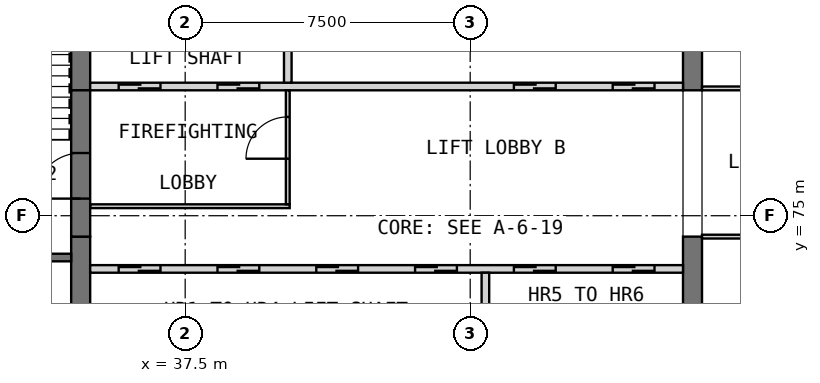
"""IFC4 building model, lengths in metres.
Left out: names, types, materials, properties, quantities, classifications, styles, units other than length and angle.
Written with IfcOpenShell. Run it as: python <this file> out.ifc"""

import sys

from ifc_helpers import new_model, si_unit, direction, frame, frame_2d, origin, place, context, subcontext, project, spatial, rectangle, extrude, element, fill, save


model = new_model("IFC4")
c1 = context("Model", 3, precision=1e-05, world=origin(), true_north=direction((0.0, 1.0)))
c2 = subcontext(c1, "Body", "Model", "MODEL_VIEW")
j1 = project(units=[si_unit("LENGTHUNIT", "METRE"), si_unit("PLANEANGLEUNIT", "RADIAN")], contexts=[c1])
p1 = place(None, origin())
s1 = spatial("IfcSite", under=j1, at=p1, CompositionType="ELEMENT")
p2 = place(p1, origin())
s2 = spatial("IfcBuilding", under=s1, at=p2, CompositionType="ELEMENT")
p3 = place(p2, frame((0.0, 0.0, 137.4)))
s3 = spatial("IfcBuildingStorey", under=s2, at=p3, CompositionType="ELEMENT", Elevation=137.4)
p4 = place(p3, frame((34.75, 68.05, 0.0), z_axis=(0.0, 0.0, 1.0), x_axis=(0.0, 1.0, 0.0)))
e1 = element("IfcWall", 1, at=p4, inside=s3, PredefinedType="SHEAR", context=c2, shape_type="SweptSolid", body=[
    extrude(rectangle(XDim=6.4, YDim=0.5, at=frame_2d((3.2, 0.0))), origin(), (0.0, 0.0, 1.0), 3.6),
])
p5 = place(p3, frame((34.75, 78.3, 0.0), z_axis=(0.0, 0.0, 1.0), x_axis=(0.0, 1.0, 0.0)))
e2 = element("IfcWall", 2, at=p5, inside=s3, PredefinedType="SHEAR", context=c2, shape_type="SweptSolid", body=[
    extrude(rectangle(XDim=3.4, YDim=0.5, at=frame_2d((1.7, 0.0))), origin(), (0.0, 0.0, 1.0), 3.6),
])
p6 = place(p3, frame((50.85, 68.05, 0.0), z_axis=(0.0, 0.0, 1.0), x_axis=(0.0, 1.0, 0.0)))
e3 = element("IfcWall", 3, at=p6, inside=s3, PredefinedType="SHEAR", context=c2, shape_type="SweptSolid", body=[
    extrude(rectangle(XDim=6.4, YDim=0.5, at=frame_2d((3.2, 0.0))), origin(), (0.0, 0.0, 1.0), 3.6),
])
p7 = place(p3, frame((50.85, 78.3, 0.0), z_axis=(0.0, 0.0, 1.0), x_axis=(0.0, 1.0, 0.0)))
e4 = element("IfcWall", 4, at=p7, inside=s3, PredefinedType="SHEAR", context=c2, shape_type="SweptSolid", body=[
    extrude(rectangle(XDim=3.4, YDim=0.5, at=frame_2d((1.7, 0.0))), origin(), (0.0, 0.0, 1.0), 3.6),
])
p8 = place(p3, frame((35.0, 73.6, 0.0), z_axis=(0.0, 0.0, 1.0), x_axis=(1.0, 0.0, 0.0)))
e5 = element("IfcWall", 5, at=p8, inside=s3, PredefinedType="SOLIDWALL", context=c2, shape_type="SweptSolid", body=[
    extrude(rectangle(XDim=15.6, YDim=0.2, at=frame_2d((7.8, 0.0))), origin(), (0.0, 0.0, 1.0), 3.6),
])
p9 = place(p8, frame((0.75, 0.0, 0.0)))
e6 = element("IfcOpeningElement", 6, at=p9, cuts=e5, PredefinedType="OPENING", context=c2, shape_type="SweptSolid", body=[
    extrude(rectangle(XDim=1.1, YDim=2.1, at=frame_2d((0.55, 1.05))), frame((0.0, 0.11, 0.0), z_axis=(0.0, -1.0, 0.0), x_axis=(1.0, 0.0, 0.0)), (0.0, 0.0, 1.0), 0.22),
])
p10 = place(p8, frame((3.35, 0.0, 0.0)))
e7 = element("IfcOpeningElement", 7, at=p10, cuts=e5, PredefinedType="OPENING", context=c2, shape_type="SweptSolid", body=[
    extrude(rectangle(XDim=1.1, YDim=2.1, at=frame_2d((0.55, 1.05))), frame((0.0, 0.11, 0.0), z_axis=(0.0, -1.0, 0.0), x_axis=(1.0, 0.0, 0.0)), (0.0, 0.0, 1.0), 0.22),
])
p11 = place(p8, frame((5.95, 0.0, 0.0)))
e8 = element("IfcOpeningElement", 8, at=p11, cuts=e5, PredefinedType="OPENING", context=c2, shape_type="SweptSolid", body=[
    extrude(rectangle(XDim=1.1, YDim=2.1, at=frame_2d((0.55, 1.05))), frame((0.0, 0.11, 0.0), z_axis=(0.0, -1.0, 0.0), x_axis=(1.0, 0.0, 0.0)), (0.0, 0.0, 1.0), 0.22),
])
p12 = place(p8, frame((8.55, 0.0, 0.0)))
e9 = element("IfcOpeningElement", 9, at=p12, cuts=e5, PredefinedType="OPENING", context=c2, shape_type="SweptSolid", body=[
    extrude(rectangle(XDim=1.1, YDim=2.1, at=frame_2d((0.55, 1.05))), frame((0.0, 0.11, 0.0), z_axis=(0.0, -1.0, 0.0), x_axis=(1.0, 0.0, 0.0)), (0.0, 0.0, 1.0), 0.22),
])
p13 = place(p8, frame((11.15, 0.0, 0.0)))
e10 = element("IfcOpeningElement", 10, at=p13, cuts=e5, PredefinedType="OPENING", context=c2, shape_type="SweptSolid", body=[
    extrude(rectangle(XDim=1.1, YDim=2.1, at=frame_2d((0.55, 1.05))), frame((0.0, 0.11, 0.0), z_axis=(0.0, -1.0, 0.0), x_axis=(1.0, 0.0, 0.0)), (0.0, 0.0, 1.0), 0.22),
])
p14 = place(p8, frame((13.75, 0.0, 0.0)))
e11 = element("IfcOpeningElement", 11, at=p14, cuts=e5, PredefinedType="OPENING", context=c2, shape_type="SweptSolid", body=[
    extrude(rectangle(XDim=1.1, YDim=2.1, at=frame_2d((0.55, 1.05))), frame((0.0, 0.11, 0.0), z_axis=(0.0, -1.0, 0.0), x_axis=(1.0, 0.0, 0.0)), (0.0, 0.0, 1.0), 0.22),
])
p15 = place(p3, frame((45.4, 71.5, 0.0), z_axis=(0.0, 0.0, 1.0), x_axis=(0.0, 1.0, 0.0)))
e12 = element("IfcWall", 12, at=p15, inside=s3, PredefinedType="SOLIDWALL", context=c2, shape_type="SweptSolid", body=[
    extrude(rectangle(XDim=2.0, YDim=0.2, at=frame_2d((1.0, 0.0))), origin(), (0.0, 0.0, 1.0), 3.6),
])
p16 = place(p3, frame((35.0, 78.4, 0.0), z_axis=(0.0, 0.0, 1.0), x_axis=(1.0, 0.0, 0.0)))
e13 = element("IfcWall", 13, at=p16, inside=s3, PredefinedType="SOLIDWALL", context=c2, shape_type="SweptSolid", body=[
    extrude(rectangle(XDim=15.6, YDim=0.2, at=frame_2d((7.8, 0.0))), origin(), (0.0, 0.0, 1.0), 3.6),
])
p17 = place(p16, frame((0.75, 0.0, 0.0)))
e14 = element("IfcOpeningElement", 14, at=p17, cuts=e13, PredefinedType="OPENING", context=c2, shape_type="SweptSolid", body=[
    extrude(rectangle(XDim=1.1, YDim=2.1, at=frame_2d((0.55, 1.05))), frame((0.0, 0.11, 0.0), z_axis=(0.0, -1.0, 0.0), x_axis=(1.0, 0.0, 0.0)), (0.0, 0.0, 1.0), 0.22),
])
p18 = place(p16, frame((3.35, 0.0, 0.0)))
e15 = element("IfcOpeningElement", 15, at=p18, cuts=e13, PredefinedType="OPENING", context=c2, shape_type="SweptSolid", body=[
    extrude(rectangle(XDim=1.1, YDim=2.1, at=frame_2d((0.55, 1.05))), frame((0.0, 0.11, 0.0), z_axis=(0.0, -1.0, 0.0), x_axis=(1.0, 0.0, 0.0)), (0.0, 0.0, 1.0), 0.22),
])
p19 = place(p16, frame((11.15, 0.0, 0.0)))
e16 = element("IfcOpeningElement", 16, at=p19, cuts=e13, PredefinedType="OPENING", context=c2, shape_type="SweptSolid", body=[
    extrude(rectangle(XDim=1.1, YDim=2.1, at=frame_2d((0.55, 1.05))), frame((0.0, 0.11, 0.0), z_axis=(0.0, -1.0, 0.0), x_axis=(1.0, 0.0, 0.0)), (0.0, 0.0, 1.0), 0.22),
])
p20 = place(p16, frame((13.75, 0.0, 0.0)))
e17 = element("IfcOpeningElement", 17, at=p20, cuts=e13, PredefinedType="OPENING", context=c2, shape_type="SweptSolid", body=[
    extrude(rectangle(XDim=1.1, YDim=2.1, at=frame_2d((0.55, 1.05))), frame((0.0, 0.11, 0.0), z_axis=(0.0, -1.0, 0.0), x_axis=(1.0, 0.0, 0.0)), (0.0, 0.0, 1.0), 0.22),
])
p21 = place(p3, frame((40.2, 78.5, 0.0), z_axis=(0.0, 0.0, 1.0), x_axis=(0.0, 1.0, 0.0)))
e18 = element("IfcWall", 18, at=p21, inside=s3, PredefinedType="SOLIDWALL", context=c2, shape_type="SweptSolid", body=[
    extrude(rectangle(XDim=3.2, YDim=0.2, at=frame_2d((1.6, 0.0))), origin(), (0.0, 0.0, 1.0), 3.6),
])
p22 = place(p3, frame((35.0, 75.25, 0.0), z_axis=(0.0, 0.0, 1.0), x_axis=(1.0, 0.0, 0.0)))
e19 = element("IfcWall", 19, at=p22, inside=s3, PredefinedType="PARTITIONING", context=c2, shape_type="SweptSolid", body=[
    extrude(rectangle(XDim=5.25, YDim=0.1, at=frame_2d((2.625, 0.0))), origin(), (0.0, 0.0, 1.0), 3.35),
])
p23 = place(p3, frame((40.2, 75.3, 0.0), z_axis=(0.0, 0.0, 1.0), x_axis=(0.0, 1.0, 0.0)))
e20 = element("IfcWall", 20, at=p23, inside=s3, PredefinedType="PARTITIONING", context=c2, shape_type="SweptSolid", body=[
    extrude(rectangle(XDim=3.0, YDim=0.1, at=frame_2d((1.5, 0.0))), origin(), (0.0, 0.0, 1.0), 3.35),
])
p24 = place(p23, frame((1.2, 0.0, 0.0)))
e21 = element("IfcOpeningElement", 21, at=p24, cuts=e20, PredefinedType="OPENING", context=c2, shape_type="SweptSolid", body=[
    extrude(rectangle(XDim=1.1, YDim=2.1, at=frame_2d((0.55, 1.05))), frame((0.0, 0.06, 0.0), z_axis=(0.0, -1.0, 0.0), x_axis=(1.0, 0.0, 0.0)), (0.0, 0.0, 1.0), 0.12),
])
p25 = place(p3, frame((34.75, 74.45, 0.0), z_axis=(0.0, 0.0, 1.0), x_axis=(0.0, 1.0, 0.0)))
e22 = element("IfcWall", 22, at=p25, inside=s3, PredefinedType="SOLIDWALL", context=c2, shape_type="SweptSolid", body=[
    extrude(rectangle(XDim=3.85, YDim=0.5, at=frame_2d((1.925, 0.0))), origin(), (0.0, 0.0, 1.0), 2.4),
])
p26 = place(p25, frame((1.0, 0.0, 0.0)))
e23 = element("IfcOpeningElement", 23, at=p26, cuts=e22, PredefinedType="OPENING", context=c2, shape_type="SweptSolid", body=[
    extrude(rectangle(XDim=1.2, YDim=2.1, at=frame_2d((0.6, 1.05))), frame((0.0, 0.26, 0.0), z_axis=(0.0, -1.0, 0.0), x_axis=(1.0, 0.0, 0.0)), (0.0, 0.0, 1.0), 0.52),
])
p27 = place(p3, frame((30.8, 73.9, 0.0), z_axis=(0.0, 0.0, 1.0), x_axis=(1.0, 0.0, 0.0)))
e24 = element("IfcWall", 24, at=p27, inside=s3, PredefinedType="SOLIDWALL", context=c2, shape_type="SweptSolid", body=[
    extrude(rectangle(XDim=3.7, YDim=0.2, at=frame_2d((1.85, 0.0))), origin(), (0.0, 0.0, 1.0), 3.35),
])
p28 = place(p27, frame((1.5, 0.0, 0.0)))
e25 = element("IfcOpeningElement", 25, at=p28, cuts=e24, PredefinedType="OPENING", context=c2, shape_type="SweptSolid", body=[
    extrude(rectangle(XDim=0.9, YDim=2.1, at=frame_2d((0.45, 1.05))), frame((0.0, 0.11, 0.0), z_axis=(0.0, -1.0, 0.0), x_axis=(1.0, 0.0, 0.0)), (0.0, 0.0, 1.0), 0.22),
])
p29 = place(p3, frame((51.1, 74.45, 0.0), z_axis=(0.0, 0.0, 1.0), x_axis=(1.0, 0.0, 0.0)))
e26 = element("IfcWall", 26, at=p29, inside=s3, PredefinedType="PARTITIONING", context=c2, shape_type="SweptSolid", body=[
    extrude(rectangle(XDim=8.1, YDim=0.1, at=frame_2d((4.05, 0.0))), origin(), (0.0, 0.0, 1.0), 3.35),
])
p30 = place(p29, frame((3.6, 0.0, 0.0)))
e27 = element("IfcOpeningElement", 27, at=p30, cuts=e26, PredefinedType="OPENING", context=c2, shape_type="SweptSolid", body=[
    extrude(rectangle(XDim=0.9, YDim=2.1, at=frame_2d((0.45, 1.05))), frame((0.0, 0.06, 0.0), z_axis=(0.0, -1.0, 0.0), x_axis=(1.0, 0.0, 0.0)), (0.0, 0.0, 1.0), 0.12),
])
p31 = place(p3, frame((51.1, 78.35, 0.0), z_axis=(0.0, 0.0, 1.0), x_axis=(1.0, 0.0, 0.0)))
e28 = element("IfcWall", 28, at=p31, inside=s3, PredefinedType="PARTITIONING", context=c2, shape_type="SweptSolid", body=[
    extrude(rectangle(XDim=8.1, YDim=0.1, at=frame_2d((4.05, 0.0))), origin(), (0.0, 0.0, 1.0), 3.35),
])
p32 = place(p31, frame((3.6, 0.0, 0.0)))
e29 = element("IfcOpeningElement", 29, at=p32, cuts=e28, PredefinedType="OPENING", context=c2, shape_type="SweptSolid", body=[
    extrude(rectangle(XDim=0.9, YDim=2.1, at=frame_2d((0.45, 1.05))), frame((0.0, 0.06, 0.0), z_axis=(0.0, -1.0, 0.0), x_axis=(1.0, 0.0, 0.0)), (0.0, 0.0, 1.0), 0.12),
])
p33 = place(p9, origin())
e30 = element("IfcDoor", 30, at=p33, inside=s3, OperationType="DOUBLE_DOOR_SLIDING", PredefinedType="DOOR", context=c2, shape_type="SweptSolid", body=[
    extrude(rectangle(XDim=1.1, YDim=2.1, at=frame_2d((0.55, 1.05))), frame((0.0, 0.025, 0.0), z_axis=(0.0, -1.0, 0.0), x_axis=(1.0, 0.0, 0.0)), (0.0, 0.0, 1.0), 0.05),
])
fill(e6, e30)
p34 = place(p10, origin())
e31 = element("IfcDoor", 31, at=p34, inside=s3, OperationType="DOUBLE_DOOR_SLIDING", PredefinedType="DOOR", context=c2, shape_type="SweptSolid", body=[
    extrude(rectangle(XDim=1.1, YDim=2.1, at=frame_2d((0.55, 1.05))), frame((0.0, 0.025, 0.0), z_axis=(0.0, -1.0, 0.0), x_axis=(1.0, 0.0, 0.0)), (0.0, 0.0, 1.0), 0.05),
])
fill(e7, e31)
p35 = place(p11, origin())
e32 = element("IfcDoor", 32, at=p35, inside=s3, OperationType="DOUBLE_DOOR_SLIDING", PredefinedType="DOOR", context=c2, shape_type="SweptSolid", body=[
    extrude(rectangle(XDim=1.1, YDim=2.1, at=frame_2d((0.55, 1.05))), frame((0.0, 0.025, 0.0), z_axis=(0.0, -1.0, 0.0), x_axis=(1.0, 0.0, 0.0)), (0.0, 0.0, 1.0), 0.05),
])
fill(e8, e32)
p36 = place(p12, origin())
e33 = element("IfcDoor", 33, at=p36, inside=s3, OperationType="DOUBLE_DOOR_SLIDING", PredefinedType="DOOR", context=c2, shape_type="SweptSolid", body=[
    extrude(rectangle(XDim=1.1, YDim=2.1, at=frame_2d((0.55, 1.05))), frame((0.0, 0.025, 0.0), z_axis=(0.0, -1.0, 0.0), x_axis=(1.0, 0.0, 0.0)), (0.0, 0.0, 1.0), 0.05),
])
fill(e9, e33)
p37 = place(p13, origin())
e34 = element("IfcDoor", 34, at=p37, inside=s3, OperationType="DOUBLE_DOOR_SLIDING", PredefinedType="DOOR", context=c2, shape_type="SweptSolid", body=[
    extrude(rectangle(XDim=1.1, YDim=2.1, at=frame_2d((0.55, 1.05))), frame((0.0, 0.025, 0.0), z_axis=(0.0, -1.0, 0.0), x_axis=(1.0, 0.0, 0.0)), (0.0, 0.0, 1.0), 0.05),
])
fill(e10, e34)
p38 = place(p14, origin())
e35 = element("IfcDoor", 35, at=p38, inside=s3, OperationType="DOUBLE_DOOR_SLIDING", PredefinedType="DOOR", context=c2, shape_type="SweptSolid", body=[
    extrude(rectangle(XDim=1.1, YDim=2.1, at=frame_2d((0.55, 1.05))), frame((0.0, 0.025, 0.0), z_axis=(0.0, -1.0, 0.0), x_axis=(1.0, 0.0, 0.0)), (0.0, 0.0, 1.0), 0.05),
])
fill(e11, e35)
p39 = place(p17, origin())
e36 = element("IfcDoor", 36, at=p39, inside=s3, OperationType="DOUBLE_DOOR_SLIDING", PredefinedType="DOOR", context=c2, shape_type="SweptSolid", body=[
    extrude(rectangle(XDim=1.1, YDim=2.1, at=frame_2d((0.55, 1.05))), frame((0.0, 0.025, 0.0), z_axis=(0.0, -1.0, 0.0), x_axis=(1.0, 0.0, 0.0)), (0.0, 0.0, 1.0), 0.05),
])
fill(e14, e36)
p40 = place(p18, origin())
e37 = element("IfcDoor", 37, at=p40, inside=s3, OperationType="DOUBLE_DOOR_SLIDING", PredefinedType="DOOR", context=c2, shape_type="SweptSolid", body=[
    extrude(rectangle(XDim=1.1, YDim=2.1, at=frame_2d((0.55, 1.05))), frame((0.0, 0.025, 0.0), z_axis=(0.0, -1.0, 0.0), x_axis=(1.0, 0.0, 0.0)), (0.0, 0.0, 1.0), 0.05),
])
fill(e15, e37)
p41 = place(p19, origin())
e38 = element("IfcDoor", 38, at=p41, inside=s3, OperationType="DOUBLE_DOOR_SLIDING", PredefinedType="DOOR", context=c2, shape_type="SweptSolid", body=[
    extrude(rectangle(XDim=1.1, YDim=2.1, at=frame_2d((0.55, 1.05))), frame((0.0, 0.025, 0.0), z_axis=(0.0, -1.0, 0.0), x_axis=(1.0, 0.0, 0.0)), (0.0, 0.0, 1.0), 0.05),
])
fill(e16, e38)
p42 = place(p20, origin())
e39 = element("IfcDoor", 39, at=p42, inside=s3, OperationType="DOUBLE_DOOR_SLIDING", PredefinedType="DOOR", context=c2, shape_type="SweptSolid", body=[
    extrude(rectangle(XDim=1.1, YDim=2.1, at=frame_2d((0.55, 1.05))), frame((0.0, 0.025, 0.0), z_axis=(0.0, -1.0, 0.0), x_axis=(1.0, 0.0, 0.0)), (0.0, 0.0, 1.0), 0.05),
])
fill(e17, e39)
p43 = place(p24, origin())
e40 = element("IfcDoor", 40, at=p43, inside=s3, OperationType="SINGLE_SWING_LEFT", PredefinedType="DOOR", context=c2, shape_type="SweptSolid", body=[
    extrude(rectangle(XDim=1.1, YDim=2.1, at=frame_2d((0.55, 1.05))), frame((0.0, 0.025, 0.0), z_axis=(0.0, -1.0, 0.0), x_axis=(1.0, 0.0, 0.0)), (0.0, 0.0, 1.0), 0.05),
])
fill(e21, e40)
p44 = place(p26, origin())
e41 = element("IfcDoor", 41, at=p44, inside=s3, OperationType="SINGLE_SWING_RIGHT", PredefinedType="DOOR", context=c2, shape_type="SweptSolid", body=[
    extrude(rectangle(XDim=1.2, YDim=2.1, at=frame_2d((0.6, 1.05))), frame((0.0, 0.025, 0.0), z_axis=(0.0, -1.0, 0.0), x_axis=(1.0, 0.0, 0.0)), (0.0, 0.0, 1.0), 0.05),
])
fill(e23, e41)
save(model, sys.argv[1])
